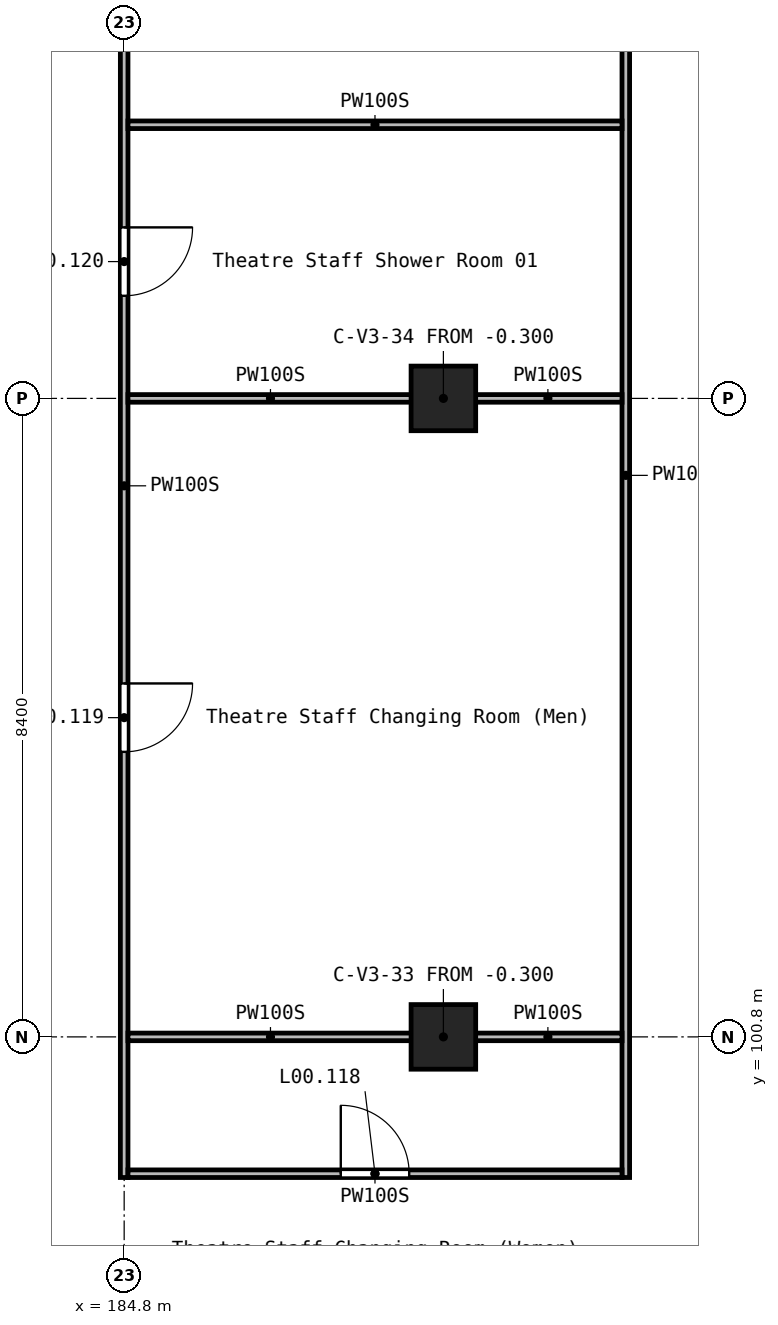
"""IFC4 building model, lengths in metres.
Left out: names, types, materials, properties, quantities, classifications, styles, units other than length and angle.
Written with IfcOpenShell. Run it as: python <this file> out.ifc"""

import sys

from ifc_helpers import new_model, si_unit, direction, frame, frame_2d, origin, origin_2d, place, context, subcontext, project, spatial, rectangle, extrude, element, fill, save


model = new_model("IFC4")
c1 = context("Model", 3, precision=1e-05, world=origin(), true_north=direction((0.0, 1.0)))
c2 = subcontext(c1, "Body", "Model", "MODEL_VIEW")
j1 = project(units=[si_unit("LENGTHUNIT", "METRE"), si_unit("PLANEANGLEUNIT", "RADIAN")], contexts=[c1])
p1 = place(None, origin())
s1 = spatial("IfcSite", under=j1, at=p1, CompositionType="ELEMENT")
p2 = place(p1, origin())
s2 = spatial("IfcBuilding", under=s1, at=p2, CompositionType="ELEMENT")
p3 = place(p2, origin())
s3 = spatial("IfcBuildingStorey", under=s2, at=p3, CompositionType="ELEMENT", Elevation=0.0)
for number, where, z_axis, x_axis in (
    (1, (189.0, 100.8, -0.3), (0.0, 0.0, 1.0), (1.0, 0.0, 0.0)),
    (2, (189.0, 109.2, -0.3), (0.0, 0.0, 1.0), (1.0, 0.0, 0.0)),
):
    element("IfcColumn", number, at=place(p3, frame(where, z_axis=z_axis, x_axis=x_axis)), inside=s3, PredefinedType="COLUMN", context=c2, shape_type="SweptSolid", body=[
        extrude(rectangle(XDim=0.85, YDim=0.85, at=origin_2d()), origin(), (0.0, 0.0, 1.0), 5.7),
    ])
p4 = place(p3, frame((184.8, 117.15, 0.0), z_axis=(0.0, 0.0, 1.0), x_axis=(0.0, -1.0, 0.0)))
e3 = element("IfcWall", 3, at=p4, inside=s3, PredefinedType="PARTITIONING", context=c2, shape_type="SweptSolid", body=[
    extrude(rectangle(XDim=18.2, YDim=0.1, at=frame_2d((9.1, 0.0))), origin(), (0.0, 0.0, 1.0), 5.05),
])
p5 = place(p4, frame((11.7, 0.0, 0.0)))
e4 = element("IfcOpeningElement", 4, at=p5, cuts=e3, PredefinedType="OPENING", context=c2, shape_type="SweptSolid", body=[
    extrude(rectangle(XDim=0.9, YDim=2.1, at=frame_2d((0.45, 1.05))), frame((0.0, 0.06, 0.0), z_axis=(0.0, -1.0, 0.0), x_axis=(1.0, 0.0, 0.0)), (0.0, 0.0, 1.0), 0.12),
])
p6 = place(p4, frame((5.7, 0.0, 0.0)))
e5 = element("IfcOpeningElement", 5, at=p6, cuts=e3, PredefinedType="OPENING", context=c2, shape_type="SweptSolid", body=[
    extrude(rectangle(XDim=0.9, YDim=2.1, at=frame_2d((0.45, 1.05))), frame((0.0, 0.06, 0.0), z_axis=(0.0, -1.0, 0.0), x_axis=(1.0, 0.0, 0.0)), (0.0, 0.0, 1.0), 0.12),
])
p7 = place(p4, frame((1.5, 0.0, 0.0)))
e6 = element("IfcOpeningElement", 6, at=p7, cuts=e3, PredefinedType="OPENING", context=c2, shape_type="SweptSolid", body=[
    extrude(rectangle(XDim=0.9, YDim=2.1, at=frame_2d((0.45, 1.05))), frame((0.0, 0.06, 0.0), z_axis=(0.0, -1.0, 0.0), x_axis=(1.0, 0.0, 0.0)), (0.0, 0.0, 1.0), 0.12),
])
p8 = place(p3, frame((191.4, 117.425, 0.0), z_axis=(0.0, 0.0, 1.0), x_axis=(0.0, -1.0, 0.0)))
e7 = element("IfcWall", 7, at=p8, inside=s3, PredefinedType="PARTITIONING", context=c2, shape_type="SweptSolid", body=[
    extrude(rectangle(XDim=18.475, YDim=0.1, at=frame_2d((9.238, 0.0))), origin(), (0.0, 0.0, 1.0), 5.05),
])
p9 = place(p3, frame((184.85, 99.0, 0.0), z_axis=(0.0, 0.0, 1.0), x_axis=(1.0, 0.0, 0.0)))
e8 = element("IfcWall", 8, at=p9, inside=s3, PredefinedType="PARTITIONING", context=c2, shape_type="SweptSolid", body=[
    extrude(rectangle(XDim=6.5, YDim=0.1, at=frame_2d((3.25, 0.0))), origin(), (0.0, 0.0, 1.0), 5.05),
])
p10 = place(p9, frame((2.8, 0.0, 0.0)))
e9 = element("IfcOpeningElement", 9, at=p10, cuts=e8, PredefinedType="OPENING", context=c2, shape_type="SweptSolid", body=[
    extrude(rectangle(XDim=0.9, YDim=2.1, at=frame_2d((0.45, 1.05))), frame((0.0, 0.06, 0.0), z_axis=(0.0, -1.0, 0.0), x_axis=(1.0, 0.0, 0.0)), (0.0, 0.0, 1.0), 0.12),
])
p11 = place(p3, frame((184.85, 100.8, 0.0), z_axis=(0.0, 0.0, 1.0), x_axis=(1.0, 0.0, 0.0)))
e10 = element("IfcWall", 10, at=p11, inside=s3, PredefinedType="PARTITIONING", context=c2, shape_type="SweptSolid", body=[
    extrude(rectangle(XDim=3.75, YDim=0.1, at=frame_2d((1.875, 0.0))), origin(), (0.0, 0.0, 1.0), 5.05),
])
p12 = place(p3, frame((189.4, 100.8, 0.0), z_axis=(0.0, 0.0, 1.0), x_axis=(1.0, 0.0, 0.0)))
e11 = element("IfcWall", 11, at=p12, inside=s3, PredefinedType="PARTITIONING", context=c2, shape_type="SweptSolid", body=[
    extrude(rectangle(XDim=1.95, YDim=0.1, at=frame_2d((0.975, 0.0))), origin(), (0.0, 0.0, 1.0), 5.05),
])
p13 = place(p3, frame((184.85, 109.2, 0.0), z_axis=(0.0, 0.0, 1.0), x_axis=(1.0, 0.0, 0.0)))
e12 = element("IfcWall", 12, at=p13, inside=s3, PredefinedType="PARTITIONING", context=c2, shape_type="SweptSolid", body=[
    extrude(rectangle(XDim=3.75, YDim=0.1, at=frame_2d((1.875, 0.0))), origin(), (0.0, 0.0, 1.0), 5.05),
])
p14 = place(p3, frame((189.4, 109.2, 0.0), z_axis=(0.0, 0.0, 1.0), x_axis=(1.0, 0.0, 0.0)))
e13 = element("IfcWall", 13, at=p14, inside=s3, PredefinedType="PARTITIONING", context=c2, shape_type="SweptSolid", body=[
    extrude(rectangle(XDim=1.95, YDim=0.1, at=frame_2d((0.975, 0.0))), origin(), (0.0, 0.0, 1.0), 5.05),
])
p15 = place(p3, frame((184.85, 112.8, 0.0), z_axis=(0.0, 0.0, 1.0), x_axis=(1.0, 0.0, 0.0)))
e14 = element("IfcWall", 14, at=p15, inside=s3, PredefinedType="PARTITIONING", context=c2, shape_type="SweptSolid", body=[
    extrude(rectangle(XDim=6.5, YDim=0.1, at=frame_2d((3.25, 0.0))), origin(), (0.0, 0.0, 1.0), 5.05),
])
p16 = place(p10, origin())
e15 = element("IfcDoor", 15, at=p16, inside=s3, OperationType="SINGLE_SWING_LEFT", PredefinedType="DOOR", context=c2, shape_type="SweptSolid", body=[
    extrude(rectangle(XDim=0.9, YDim=2.1, at=frame_2d((0.45, 1.05))), frame((0.0, 0.025, 0.0), z_axis=(0.0, -1.0, 0.0), x_axis=(1.0, 0.0, 0.0)), (0.0, 0.0, 1.0), 0.05),
])
fill(e9, e15)
p17 = place(p5, origin())
e16 = element("IfcDoor", 16, at=p17, inside=s3, OperationType="SINGLE_SWING_RIGHT", PredefinedType="DOOR", context=c2, shape_type="SweptSolid", body=[
    extrude(rectangle(XDim=0.9, YDim=2.1, at=frame_2d((0.45, 1.05))), frame((0.0, 0.025, 0.0), z_axis=(0.0, -1.0, 0.0), x_axis=(1.0, 0.0, 0.0)), (0.0, 0.0, 1.0), 0.05),
])
fill(e4, e16)
p18 = place(p6, origin())
e17 = element("IfcDoor", 17, at=p18, inside=s3, OperationType="SINGLE_SWING_LEFT", PredefinedType="DOOR", context=c2, shape_type="SweptSolid", body=[
    extrude(rectangle(XDim=0.9, YDim=2.1, at=frame_2d((0.45, 1.05))), frame((0.0, 0.025, 0.0), z_axis=(0.0, -1.0, 0.0), x_axis=(1.0, 0.0, 0.0)), (0.0, 0.0, 1.0), 0.05),
])
fill(e5, e17)
save(model, sys.argv[1])
